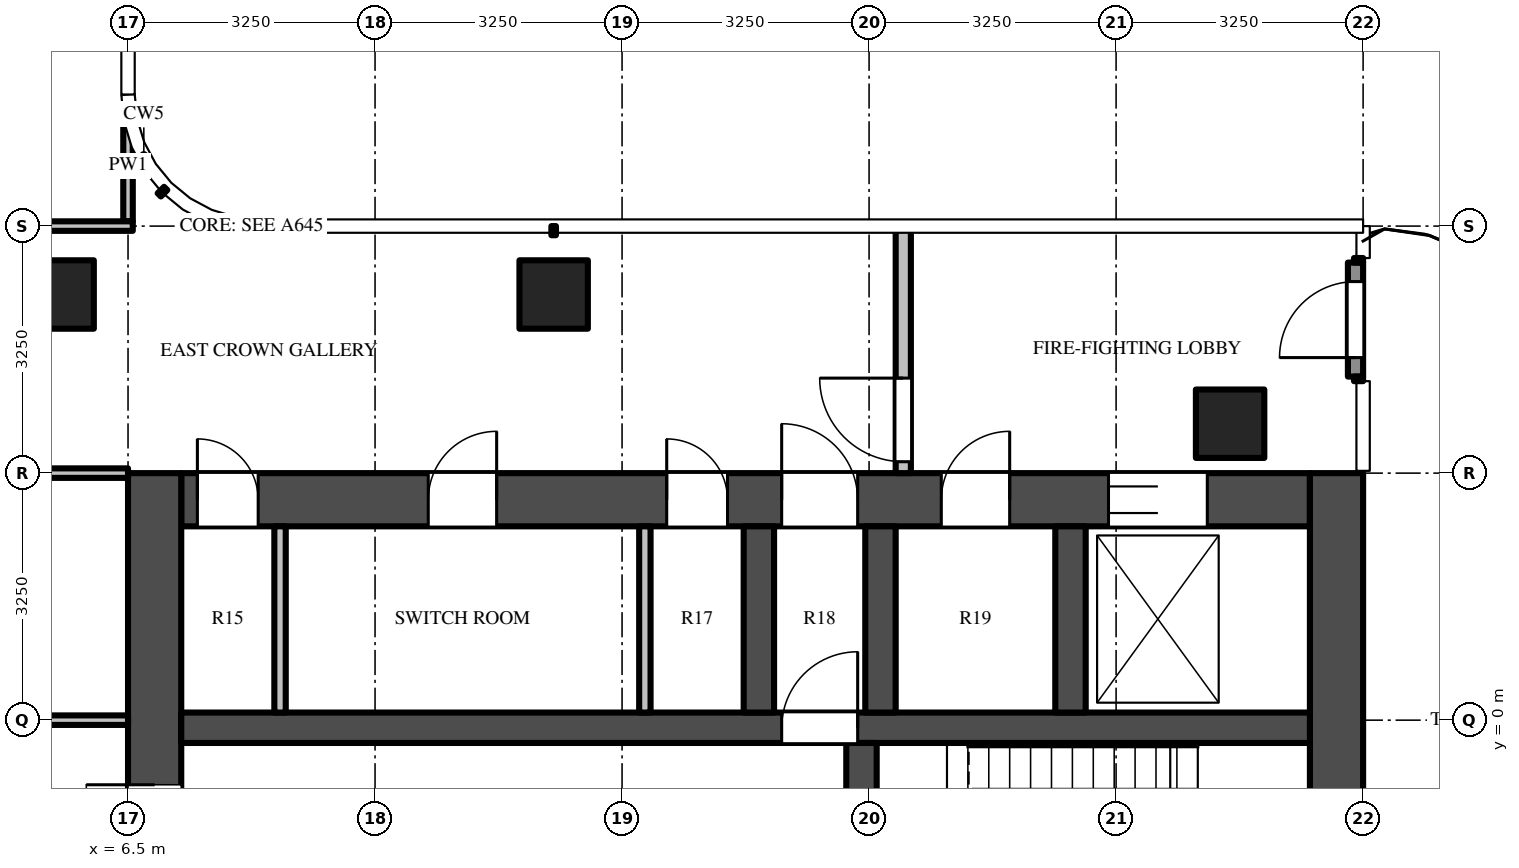
"""IFC4 building model, lengths in metres.
Left out: names, types, materials, properties, quantities, classifications, styles, units other than length and angle.
Written with IfcOpenShell. Run it as: python <this file> out.ifc"""

import sys

from ifc_helpers import new_model, si_unit, direction, frame, frame_2d, origin, origin_2d, place, context, subcontext, project, spatial, rectangle, extrude, source, transform, mapped, element, fill, save


model = new_model("IFC4")
c1 = context("Model", 3, precision=1e-05, world=origin(), true_north=direction((0.0, 1.0)))
c2 = subcontext(c1, "Body", "Model", "MODEL_VIEW")
j1 = project(units=[si_unit("LENGTHUNIT", "METRE"), si_unit("PLANEANGLEUNIT", "RADIAN")], contexts=[c1])
p1 = place(None, origin())
s1 = spatial("IfcSite", under=j1, at=p1, CompositionType="ELEMENT")
p2 = place(p1, origin())
s2 = spatial("IfcBuilding", under=s1, at=p2, CompositionType="ELEMENT")
p3 = place(p2, frame((0.0, 0.0, 338.1)))
s3 = spatial("IfcBuildingStorey", under=s2, at=p3, CompositionType="ELEMENT", Elevation=338.1)
m1 = source(origin(), c2, "Body", "SweptSolid", [
    extrude(rectangle(XDim=0.9, YDim=0.9, at=origin_2d()), origin(), (0.0, 0.0, 1.0), 4.0),
])
for number, where, z_axis, x_axis in (
    (1, (12.1, 5.6, 0.0), (0.0, 0.0, 1.0), (1.0, 0.0, 0.0)),
    (2, (21.0, 3.9, 0.0), (0.0, 0.0, 1.0), (1.0, 0.0, 0.0)),
    (3, (5.6, 5.6, 0.0), (0.0, 0.0, 1.0), (1.0, 0.0, 0.0)),
):
    element("IfcColumn", number, at=place(p3, frame(where, z_axis=z_axis, x_axis=x_axis)), inside=s3, PredefinedType="COLUMN", context=c2, shape_type="MappedRepresentation", body=[
        mapped(m1, transform((0.0, 0.0, 0.0))),
    ])
m2 = source(origin(), c2, "Body", "SweptSolid", [
    extrude(rectangle(XDim=14.85, YDim=0.7, at=frame_2d((7.425, 0.0))), origin(), (0.0, 0.0, 1.0), 3.75),
])
p4 = place(p3, frame((7.2, 2.9, 0.0), z_axis=(0.0, 0.0, 1.0), x_axis=(1.0, 0.0, 0.0)))
e4 = element("IfcWall", 4, at=p4, inside=s3, PredefinedType="SHEAR", context=c2, shape_type="MappedRepresentation", body=[
    mapped(m2, transform((0.0, 0.0, 0.0))),
])
m3 = source(origin(), c2, "Body", "SweptSolid", [
    extrude(rectangle(XDim=1.3, YDim=2.1, at=frame_2d((0.65, 1.05))), frame((0.0, 0.36, 0.0), z_axis=(0.0, -1.0, 0.0), x_axis=(1.0, 0.0, 0.0)), (0.0, 0.0, 1.0), 0.72),
])
p5 = place(p4, frame((12.2, 0.0, 0.0)))
e5 = element("IfcOpeningElement", 5, at=p5, cuts=e4, PredefinedType="OPENING", context=c2, shape_type="MappedRepresentation", body=[
    mapped(m3, transform((0.0, 0.0, 0.0))),
])
m4 = source(origin(), c2, "Body", "SweptSolid", [
    extrude(rectangle(XDim=1.0, YDim=2.1, at=frame_2d((0.5, 1.05))), frame((0.0, 0.36, 0.0), z_axis=(0.0, -1.0, 0.0), x_axis=(1.0, 0.0, 0.0)), (0.0, 0.0, 1.0), 0.72),
])
p6 = place(p4, frame((7.9, 0.0, 0.0)))
e6 = element("IfcOpeningElement", 6, at=p6, cuts=e4, PredefinedType="OPENING", context=c2, shape_type="MappedRepresentation", body=[
    mapped(m4, transform((0.0, 0.0, 0.0))),
])
m5 = source(origin(), c2, "Body", "SweptSolid", [
    extrude(rectangle(XDim=0.8, YDim=2.1, at=frame_2d((0.4, 1.05))), frame((0.0, 0.36, 0.0), z_axis=(0.0, -1.0, 0.0), x_axis=(1.0, 0.0, 0.0)), (0.0, 0.0, 1.0), 0.72),
])
p7 = place(p4, frame((0.212, 0.0, 0.0)))
e7 = element("IfcOpeningElement", 7, at=p7, cuts=e4, PredefinedType="OPENING", context=c2, shape_type="MappedRepresentation", body=[
    mapped(m5, transform((0.0, 0.0, 0.0))),
])
m6 = source(origin(), c2, "Body", "SweptSolid", [
    extrude(rectangle(XDim=0.9, YDim=2.1, at=frame_2d((0.45, 1.05))), frame((0.0, 0.36, 0.0), z_axis=(0.0, -1.0, 0.0), x_axis=(1.0, 0.0, 0.0)), (0.0, 0.0, 1.0), 0.72),
])
p8 = place(p4, frame((3.25, 0.0, 0.0)))
e8 = element("IfcOpeningElement", 8, at=p8, cuts=e4, PredefinedType="OPENING", context=c2, shape_type="MappedRepresentation", body=[
    mapped(m6, transform((0.0, 0.0, 0.0))),
])
p9 = place(p4, frame((6.387, 0.0, 0.0)))
e9 = element("IfcOpeningElement", 9, at=p9, cuts=e4, PredefinedType="OPENING", context=c2, shape_type="MappedRepresentation", body=[
    mapped(m5, transform((0.0, 0.0, 0.0))),
])
p10 = place(p4, frame((10.0, 0.0, 0.0)))
e10 = element("IfcOpeningElement", 10, at=p10, cuts=e4, PredefinedType="OPENING", context=c2, shape_type="MappedRepresentation", body=[
    mapped(m6, transform((0.0, 0.0, 0.0))),
])
m7 = source(origin(), c2, "Body", "SweptSolid", [
    extrude(rectangle(XDim=9.05, YDim=0.7, at=frame_2d((4.525, 0.0))), origin(), (0.0, 0.0, 1.0), 3.75),
])
p11 = place(p3, frame((6.85, -5.8, 0.0), z_axis=(0.0, 0.0, 1.0), x_axis=(0.0, 1.0, 0.0)))
e11 = element("IfcWall", 11, at=p11, inside=s3, PredefinedType="SHEAR", context=c2, shape_type="MappedRepresentation", body=[
    mapped(m7, transform((0.0, 0.0, 0.0))),
])
m8 = source(origin(), c2, "Body", "SweptSolid", [
    extrude(rectangle(XDim=1.8, YDim=2.1, at=frame_2d((0.9, 1.05))), frame((0.0, 0.36, 0.0), z_axis=(0.0, -1.0, 0.0), x_axis=(1.0, 0.0, 0.0)), (0.0, 0.0, 1.0), 0.72),
])
p12 = place(p11, frame((3.15, 0.0, 0.0)))
e12 = element("IfcOpeningElement", 12, at=p12, cuts=e11, PredefinedType="OPENING", context=c2, shape_type="MappedRepresentation", body=[
    mapped(m8, transform((0.0, 0.0, 0.0))),
])
p13 = place(p3, frame((22.4, -5.8, 0.0), z_axis=(0.0, 0.0, 1.0), x_axis=(0.0, 1.0, 0.0)))
e13 = element("IfcWall", 13, at=p13, inside=s3, PredefinedType="SHEAR", context=c2, shape_type="MappedRepresentation", body=[
    mapped(m7, transform((0.0, 0.0, 0.0))),
])
m9 = source(origin(), c2, "Body", "SweptSolid", [
    extrude(rectangle(XDim=14.85, YDim=0.4, at=frame_2d((7.425, 0.0))), origin(), (0.0, 0.0, 1.0), 3.75),
])
p14 = place(p3, frame((7.2, -0.1, 0.0), z_axis=(0.0, 0.0, 1.0), x_axis=(1.0, 0.0, 0.0)))
e14 = element("IfcWall", 14, at=p14, inside=s3, PredefinedType="SHEAR", context=c2, shape_type="MappedRepresentation", body=[
    mapped(m9, transform((0.0, 0.0, 0.0))),
])
m10 = source(origin(), c2, "Body", "SweptSolid", [
    extrude(rectangle(XDim=1.0, YDim=2.1, at=frame_2d((0.5, 1.05))), frame((0.0, 0.21, 0.0), z_axis=(0.0, -1.0, 0.0), x_axis=(1.0, 0.0, 0.0)), (0.0, 0.0, 1.0), 0.42),
])
p15 = place(p14, frame((7.9, 0.0, 0.0)))
e15 = element("IfcOpeningElement", 15, at=p15, cuts=e14, PredefinedType="OPENING", context=c2, shape_type="MappedRepresentation", body=[
    mapped(m10, transform((0.0, 0.0, 0.0))),
])
m11 = source(origin(), c2, "Body", "SweptSolid", [
    extrude(rectangle(XDim=5.5, YDim=0.4, at=frame_2d((2.75, 0.0))), origin(), (0.0, 0.0, 1.0), 3.75),
])
p16 = place(p3, frame((16.15, -5.8, 0.0), z_axis=(0.0, 0.0, 1.0), x_axis=(0.0, 1.0, 0.0)))
e16 = element("IfcWall", 16, at=p16, inside=s3, PredefinedType="SHEAR", context=c2, shape_type="MappedRepresentation", body=[
    mapped(m11, transform((0.0, 0.0, 0.0))),
])
m12 = source(origin(), c2, "Body", "SweptSolid", [
    extrude(rectangle(XDim=1.1, YDim=2.1, at=frame_2d((0.55, 1.05))), frame((0.0, 0.21, 0.0), z_axis=(0.0, -1.0, 0.0), x_axis=(1.0, 0.0, 0.0)), (0.0, 0.0, 1.0), 0.42),
])
p17 = place(p16, frame((0.725, 0.0, 0.0)))
e17 = element("IfcOpeningElement", 17, at=p17, cuts=e16, PredefinedType="OPENING", context=c2, shape_type="MappedRepresentation", body=[
    mapped(m12, transform((0.0, 0.0, 0.0))),
])
p18 = place(p16, frame((3.675, 0.0, 0.0)))
e18 = element("IfcOpeningElement", 18, at=p18, cuts=e16, PredefinedType="OPENING", context=c2, shape_type="MappedRepresentation", body=[
    mapped(m12, transform((0.0, 0.0, 0.0))),
])
m13 = source(origin(), c2, "Body", "SweptSolid", [
    extrude(rectangle(XDim=2.45, YDim=0.4, at=frame_2d((1.225, 0.0))), origin(), (0.0, 0.0, 1.0), 3.75),
])
for number, where, z_axis, x_axis in (
    (19, (14.8, 0.1, 0.0), (0.0, 0.0, 1.0), (0.0, 1.0, 0.0)),
    (20, (16.4, 0.1, 0.0), (0.0, 0.0, 1.0), (0.0, 1.0, 0.0)),
    (21, (18.9, 0.1, 0.0), (0.0, 0.0, 1.0), (0.0, 1.0, 0.0)),
):
    element("IfcWall", number, at=place(p3, frame(where, z_axis=z_axis, x_axis=x_axis)), inside=s3, PredefinedType="SHEAR", context=c2, shape_type="MappedRepresentation", body=[
        mapped(m13, transform((0.0, 0.0, 0.0))),
    ])
m14 = source(origin(), c2, "Body", "SweptSolid", [
    extrude(rectangle(XDim=3.25, YDim=0.2, at=frame_2d((1.625, 0.0))), origin(), (0.0, 0.0, 1.0), 3.75),
])
p19 = place(p3, frame((16.7, 3.25, 0.0), z_axis=(0.0, 0.0, 1.0), x_axis=(0.0, 1.0, 0.0)))
e22 = element("IfcWall", 22, at=p19, inside=s3, PredefinedType="PARTITIONING", context=c2, shape_type="MappedRepresentation", body=[
    mapped(m14, transform((0.0, 0.0, 0.0))),
])
m15 = source(origin(), c2, "Body", "SweptSolid", [
    extrude(rectangle(XDim=1.1, YDim=2.1, at=frame_2d((0.55, 1.05))), frame((0.0, 0.11, 0.0), z_axis=(0.0, -1.0, 0.0), x_axis=(1.0, 0.0, 0.0)), (0.0, 0.0, 1.0), 0.22),
])
p20 = place(p19, frame((0.15, 0.0, 0.0)))
e23 = element("IfcOpeningElement", 23, at=p20, cuts=e22, PredefinedType="OPENING", context=c2, shape_type="MappedRepresentation", body=[
    mapped(m15, transform((0.0, 0.0, 0.0))),
])
m16 = source(origin(), c2, "Body", "SweptSolid", [
    extrude(rectangle(XDim=2.45, YDim=0.15, at=frame_2d((1.225, 0.0))), origin(), (0.0, 0.0, 1.0), 3.75),
])
for number, where, z_axis, x_axis in (
    (24, (8.5, 0.1, 0.0), (0.0, 0.0, 1.0), (0.0, 1.0, 0.0)),
    (25, (13.3, 0.1, 0.0), (0.0, 0.0, 1.0), (0.0, 1.0, 0.0)),
):
    element("IfcWall", number, at=place(p3, frame(where, z_axis=z_axis, x_axis=x_axis)), inside=s3, PredefinedType="PARTITIONING", context=c2, shape_type="MappedRepresentation", body=[
        mapped(m16, transform((0.0, 0.0, 0.0))),
    ])
m17 = source(origin(), c2, "Body", "SweptSolid", [
    extrude(rectangle(XDim=1.5, YDim=0.2, at=frame_2d((0.75, 0.0))), origin(), (0.0, 0.0, 1.0), 3.75),
])
p21 = place(p3, frame((22.65, 4.52, 0.0), z_axis=(0.0, 0.0, 1.0), x_axis=(0.0, 1.0, 0.0)))
e26 = element("IfcWall", 26, at=p21, inside=s3, PredefinedType="SOLIDWALL", context=c2, shape_type="MappedRepresentation", body=[
    mapped(m17, transform((0.0, 0.0, 0.0))),
])
m18 = source(origin(), c2, "Body", "SweptSolid", [
    extrude(rectangle(XDim=1.0, YDim=2.4, at=frame_2d((0.5, 1.2))), frame((0.0, 0.11, 0.0), z_axis=(0.0, -1.0, 0.0), x_axis=(1.0, 0.0, 0.0)), (0.0, 0.0, 1.0), 0.22),
])
p22 = place(p21, frame((0.25, 0.0, 0.0)))
e27 = element("IfcOpeningElement", 27, at=p22, cuts=e26, PredefinedType="OPENING", context=c2, shape_type="MappedRepresentation", body=[
    mapped(m18, transform((0.0, 0.0, 0.0))),
])
m19 = source(origin(), c2, "Body", "SweptSolid", [
    extrude(rectangle(XDim=1.469, YDim=0.125, at=frame_2d((0.734, 0.0))), origin(), (0.0, 0.0, 1.0), 3.75),
])
p23 = place(p3, frame((6.5, 6.562, 0.0), z_axis=(0.0, 0.0, 1.0), x_axis=(0.0, 1.0, 0.0)))
e28 = element("IfcWall", 28, at=p23, inside=s3, PredefinedType="PARTITIONING", context=c2, shape_type="MappedRepresentation", body=[
    mapped(m19, transform((0.0, 0.0, 0.0))),
])
m20 = source(origin(), c2, "Body", "SweptSolid", [
    extrude(rectangle(XDim=5.363, YDim=0.125, at=frame_2d((2.681, 0.0))), origin(), (0.0, 0.0, 1.0), 3.046),
])
p24 = place(p3, frame((6.5, 0.0, 0.0), z_axis=(0.0, 0.0, 1.0), x_axis=(-1.0, 0.0, 0.0)))
e29 = element("IfcWall", 29, at=p24, inside=s3, PredefinedType="PARTITIONING", context=c2, shape_type="MappedRepresentation", body=[
    mapped(m20, transform((0.0, 0.0, 0.0))),
])
m21 = source(origin(), c2, "Body", "SweptSolid", [
    extrude(rectangle(XDim=1.0, YDim=2.1, at=frame_2d((0.5, 1.05))), frame((0.0, 0.073, 0.0), z_axis=(0.0, -1.0, 0.0), x_axis=(1.0, 0.0, 0.0)), (0.0, 0.0, 1.0), 0.145),
])
p25 = place(p24, frame((3.95, 0.0, 0.0)))
e30 = element("IfcOpeningElement", 30, at=p25, cuts=e29, PredefinedType="OPENING", context=c2, shape_type="MappedRepresentation", body=[
    mapped(m21, transform((0.0, 0.0, 0.0))),
])
p26 = place(p3, frame((1.137, 3.25, 0.0), z_axis=(0.0, 0.0, 1.0), x_axis=(1.0, 0.0, 0.0)))
e31 = element("IfcWall", 31, at=p26, inside=s3, PredefinedType="PARTITIONING", context=c2, shape_type="MappedRepresentation", body=[
    mapped(m20, transform((0.0, 0.0, 0.0))),
])
m22 = source(origin(), c2, "Body", "SweptSolid", [
    extrude(rectangle(XDim=7.825, YDim=0.125, at=frame_2d((3.913, 0.0))), origin(), (0.0, 0.0, 1.0), 2.83),
])
p27 = place(p3, frame((-1.262, 6.5, 0.0), z_axis=(0.0, 0.0, 1.0), x_axis=(1.0, 0.0, 0.0)))
e32 = element("IfcWall", 32, at=p27, inside=s3, PredefinedType="PARTITIONING", context=c2, shape_type="MappedRepresentation", body=[
    mapped(m22, transform((0.0, 0.0, 0.0))),
])
m23 = source(origin(), c2, "Body", "SweptSolid", [
    extrude(rectangle(XDim=1.8, YDim=2.1, at=frame_2d((0.9, 1.05))), frame((0.0, 0.073, 0.0), z_axis=(0.0, -1.0, 0.0), x_axis=(1.0, 0.0, 0.0)), (0.0, 0.0, 1.0), 0.145),
])
p28 = place(p27, frame((4.512, 0.0, 0.0)))
e33 = element("IfcOpeningElement", 33, at=p28, cuts=e32, PredefinedType="OPENING", context=c2, shape_type="MappedRepresentation", body=[
    mapped(m23, transform((0.0, 0.0, 0.0))),
])
m24 = source(origin(), c2, "Body", "SweptSolid", [
    extrude(rectangle(XDim=1.3, YDim=2.1, at=frame_2d((0.65, 1.05))), frame((0.0, -0.275, 0.0), z_axis=(0.0, -1.0, 0.0), x_axis=(1.0, 0.0, 0.0)), (0.0, 0.0, 1.0), 0.05),
])
p29 = place(p5, origin())
e34 = element("IfcDoor", 34, at=p29, inside=s3, OperationType="DOUBLE_DOOR_SLIDING", PredefinedType="DOOR", context=c2, shape_type="MappedRepresentation", body=[
    mapped(m24, transform((0.0, 0.0, 0.0))),
])
fill(e5, e34)
m25 = source(origin(), c2, "Body", "SweptSolid", [
    extrude(rectangle(XDim=1.8, YDim=2.1, at=frame_2d((0.9, 1.05))), frame((0.0, -0.275, 0.0), z_axis=(0.0, -1.0, 0.0), x_axis=(1.0, 0.0, 0.0)), (0.0, 0.0, 1.0), 0.05),
])
p30 = place(p12, origin())
e35 = element("IfcDoor", 35, at=p30, inside=s3, OperationType="DOUBLE_DOOR_SINGLE_SWING", PredefinedType="DOOR", context=c2, shape_type="MappedRepresentation", body=[
    mapped(m25, transform((0.0, 0.0, 0.0))),
])
fill(e12, e35)
m26 = source(origin(), c2, "Body", "SweptSolid", [
    extrude(rectangle(XDim=1.0, YDim=2.1, at=frame_2d((0.5, 1.05))), frame((0.0, 0.025, 0.0), z_axis=(0.0, -1.0, 0.0), x_axis=(1.0, 0.0, 0.0)), (0.0, 0.0, 1.0), 0.05),
])
p31 = place(p15, origin())
e36 = element("IfcDoor", 36, at=p31, inside=s3, OperationType="SINGLE_SWING_RIGHT", PredefinedType="DOOR", context=c2, shape_type="MappedRepresentation", body=[
    mapped(m26, transform((0.0, 0.0, 0.0))),
])
fill(e15, e36)
m27 = source(origin(), c2, "Body", "SweptSolid", [
    extrude(rectangle(XDim=1.0, YDim=2.1, at=frame_2d((0.5, 1.05))), frame((0.0, -0.275, 0.0), z_axis=(0.0, -1.0, 0.0), x_axis=(1.0, 0.0, 0.0)), (0.0, 0.0, 1.0), 0.05),
])
p32 = place(p6, origin())
e37 = element("IfcDoor", 37, at=p32, inside=s3, OperationType="SINGLE_SWING_LEFT", PredefinedType="DOOR", context=c2, shape_type="MappedRepresentation", body=[
    mapped(m27, transform((0.0, 0.0, 0.0))),
])
fill(e6, e37)
m28 = source(origin(), c2, "Body", "SweptSolid", [
    extrude(rectangle(XDim=1.1, YDim=2.1, at=frame_2d((0.55, 1.05))), frame((0.0, 0.025, 0.0), z_axis=(0.0, -1.0, 0.0), x_axis=(1.0, 0.0, 0.0)), (0.0, 0.0, 1.0), 0.05),
])
p33 = place(p20, origin())
e38 = element("IfcDoor", 38, at=p33, inside=s3, OperationType="SINGLE_SWING_RIGHT", PredefinedType="DOOR", context=c2, shape_type="MappedRepresentation", body=[
    mapped(m28, transform((0.0, 0.0, 0.0))),
])
fill(e23, e38)
m29 = source(origin(), c2, "Body", "SweptSolid", [
    extrude(rectangle(XDim=0.8, YDim=2.1, at=frame_2d((0.4, 1.05))), frame((0.0, -0.275, 0.0), z_axis=(0.0, -1.0, 0.0), x_axis=(1.0, 0.0, 0.0)), (0.0, 0.0, 1.0), 0.05),
])
p34 = place(p7, origin())
e39 = element("IfcDoor", 39, at=p34, inside=s3, OperationType="SINGLE_SWING_LEFT", PredefinedType="DOOR", context=c2, shape_type="MappedRepresentation", body=[
    mapped(m29, transform((0.0, 0.0, 0.0))),
])
fill(e7, e39)
m30 = source(origin(), c2, "Body", "SweptSolid", [
    extrude(rectangle(XDim=0.9, YDim=2.1, at=frame_2d((0.45, 1.05))), frame((0.0, -0.275, 0.0), z_axis=(0.0, -1.0, 0.0), x_axis=(1.0, 0.0, 0.0)), (0.0, 0.0, 1.0), 0.05),
])
p35 = place(p8, origin())
e40 = element("IfcDoor", 40, at=p35, inside=s3, OperationType="SINGLE_SWING_RIGHT", PredefinedType="DOOR", context=c2, shape_type="MappedRepresentation", body=[
    mapped(m30, transform((0.0, 0.0, 0.0))),
])
fill(e8, e40)
p36 = place(p9, origin())
e41 = element("IfcDoor", 41, at=p36, inside=s3, OperationType="SINGLE_SWING_LEFT", PredefinedType="DOOR", context=c2, shape_type="MappedRepresentation", body=[
    mapped(m29, transform((0.0, 0.0, 0.0))),
])
fill(e9, e41)
p37 = place(p10, origin())
e42 = element("IfcDoor", 42, at=p37, inside=s3, OperationType="SINGLE_SWING_RIGHT", PredefinedType="DOOR", context=c2, shape_type="MappedRepresentation", body=[
    mapped(m30, transform((0.0, 0.0, 0.0))),
])
fill(e10, e42)
m31 = source(origin(), c2, "Body", "SweptSolid", [
    extrude(rectangle(XDim=1.0, YDim=2.4, at=frame_2d((0.5, 1.2))), frame((0.0, 0.025, 0.0), z_axis=(0.0, -1.0, 0.0), x_axis=(1.0, 0.0, 0.0)), (0.0, 0.0, 1.0), 0.05),
])
p38 = place(p22, origin())
e43 = element("IfcDoor", 43, at=p38, inside=s3, OperationType="SINGLE_SWING_LEFT", PredefinedType="DOOR", context=c2, shape_type="MappedRepresentation", body=[
    mapped(m31, transform((0.0, 0.0, 0.0))),
])
fill(e27, e43)
save(model, sys.argv[1])
